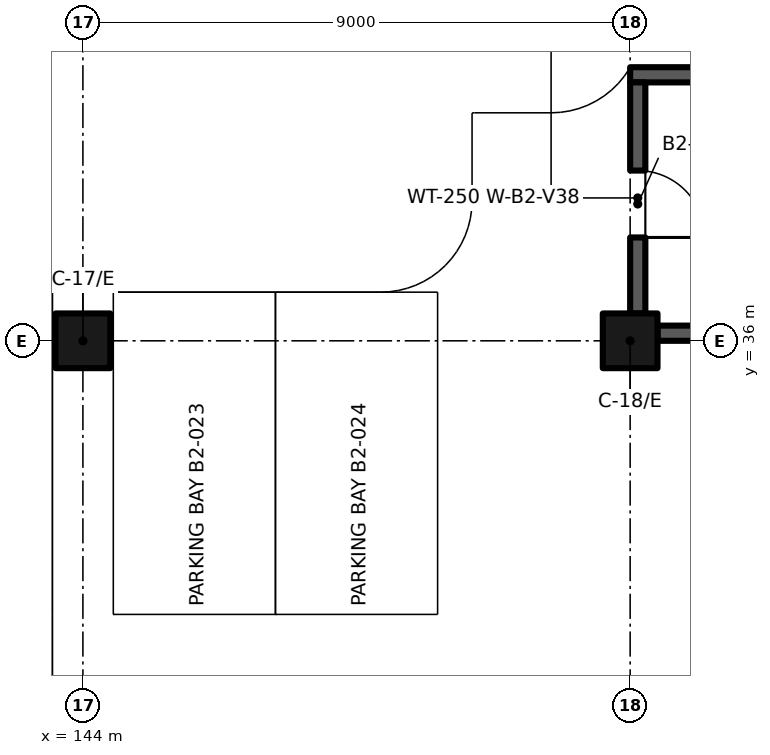
"""IFC4 building model, lengths in metres.
Left out: names, types, materials, properties, quantities, classifications, styles, units other than length and angle.
Written with IfcOpenShell. Run it as: python <this file> out.ifc"""

import sys

from ifc_helpers import new_model, si_unit, direction, frame, frame_2d, origin, origin_2d, place, context, subcontext, project, spatial, rectangle, extrude, element, fill, save


model = new_model("IFC4")
c1 = context("Model", 3, precision=1e-05, world=origin(), true_north=direction((0.0, 1.0)))
c2 = subcontext(c1, "Body", "Model", "MODEL_VIEW")
j1 = project(units=[si_unit("LENGTHUNIT", "METRE"), si_unit("PLANEANGLEUNIT", "RADIAN")], contexts=[c1])
p1 = place(None, origin())
s1 = spatial("IfcSite", under=j1, at=p1, CompositionType="ELEMENT")
p2 = place(p1, origin())
s2 = spatial("IfcBuilding", under=s1, at=p2, CompositionType="ELEMENT")
p3 = place(p2, frame((0.0, 0.0, -9.9)))
s3 = spatial("IfcBuildingStorey", under=s2, at=p3, CompositionType="ELEMENT", Elevation=-9.9)
for number, where, z_axis, x_axis in (
    (1, (144.0, 36.0, 0.0), (0.0, 0.0, 1.0), (1.0, 0.0, 0.0)),
    (2, (153.0, 36.0, 0.0), (0.0, 0.0, 1.0), (1.0, 0.0, 0.0)),
):
    element("IfcColumn", number, at=place(p3, frame(where, z_axis=z_axis, x_axis=x_axis)), inside=s3, PredefinedType="COLUMN", context=c2, shape_type="SweptSolid", body=[
        extrude(rectangle(XDim=0.9, YDim=0.9, at=origin_2d()), origin(), (0.0, 0.0, 1.0), 4.8),
    ])
p4 = place(p3, frame((153.45, 36.125, 0.0), z_axis=(0.0, 0.0, 1.0), x_axis=(1.0, 0.0, 0.0)))
e3 = element("IfcWall", 3, at=p4, inside=s3, PredefinedType="SHEAR", context=c2, shape_type="SweptSolid", body=[
    extrude(rectangle(XDim=8.1, YDim=0.25, at=frame_2d((4.05, 0.0))), origin(), (0.0, 0.0, 1.0), 4.8),
])
p5 = place(p3, frame((153.0, 40.375, 0.0), z_axis=(0.0, 0.0, 1.0), x_axis=(1.0, 0.0, 0.0)))
e4 = element("IfcWall", 4, at=p5, inside=s3, PredefinedType="SHEAR", context=c2, shape_type="SweptSolid", body=[
    extrude(rectangle(XDim=9.0, YDim=0.25, at=frame_2d((4.5, 0.0))), origin(), (0.0, 0.0, 1.0), 4.8),
])
p6 = place(p3, frame((153.125, 36.45, 0.0), z_axis=(0.0, 0.0, 1.0), x_axis=(0.0, 1.0, 0.0)))
e5 = element("IfcWall", 5, at=p6, inside=s3, PredefinedType="SHEAR", context=c2, shape_type="SweptSolid", body=[
    extrude(rectangle(XDim=3.8, YDim=0.25, at=frame_2d((1.9, 0.0))), origin(), (0.0, 0.0, 1.0), 4.8),
])
p7 = place(p6, frame((2.35, 0.0, 0.0), z_axis=(0.0, 0.0, 1.0), x_axis=(-1.0, 0.0, 0.0)))
e6 = element("IfcOpeningElement", 6, at=p7, cuts=e5, PredefinedType="OPENING", context=c2, shape_type="SweptSolid", body=[
    extrude(rectangle(XDim=1.1, YDim=2.1, at=frame_2d((0.55, 1.05))), frame((0.0, 0.135, 0.0), z_axis=(0.0, -1.0, 0.0), x_axis=(1.0, 0.0, 0.0)), (0.0, 0.0, 1.0), 0.27),
])
p8 = place(p7, origin())
e7 = element("IfcDoor", 7, at=p8, inside=s3, OperationType="SINGLE_SWING_RIGHT", PredefinedType="DOOR", context=c2, shape_type="SweptSolid", body=[
    extrude(rectangle(XDim=1.1, YDim=2.1, at=frame_2d((0.55, 1.05))), frame((0.0, 0.025, 0.0), z_axis=(0.0, -1.0, 0.0), x_axis=(1.0, 0.0, 0.0)), (0.0, 0.0, 1.0), 0.05),
])
fill(e6, e7)
save(model, sys.argv[1])
